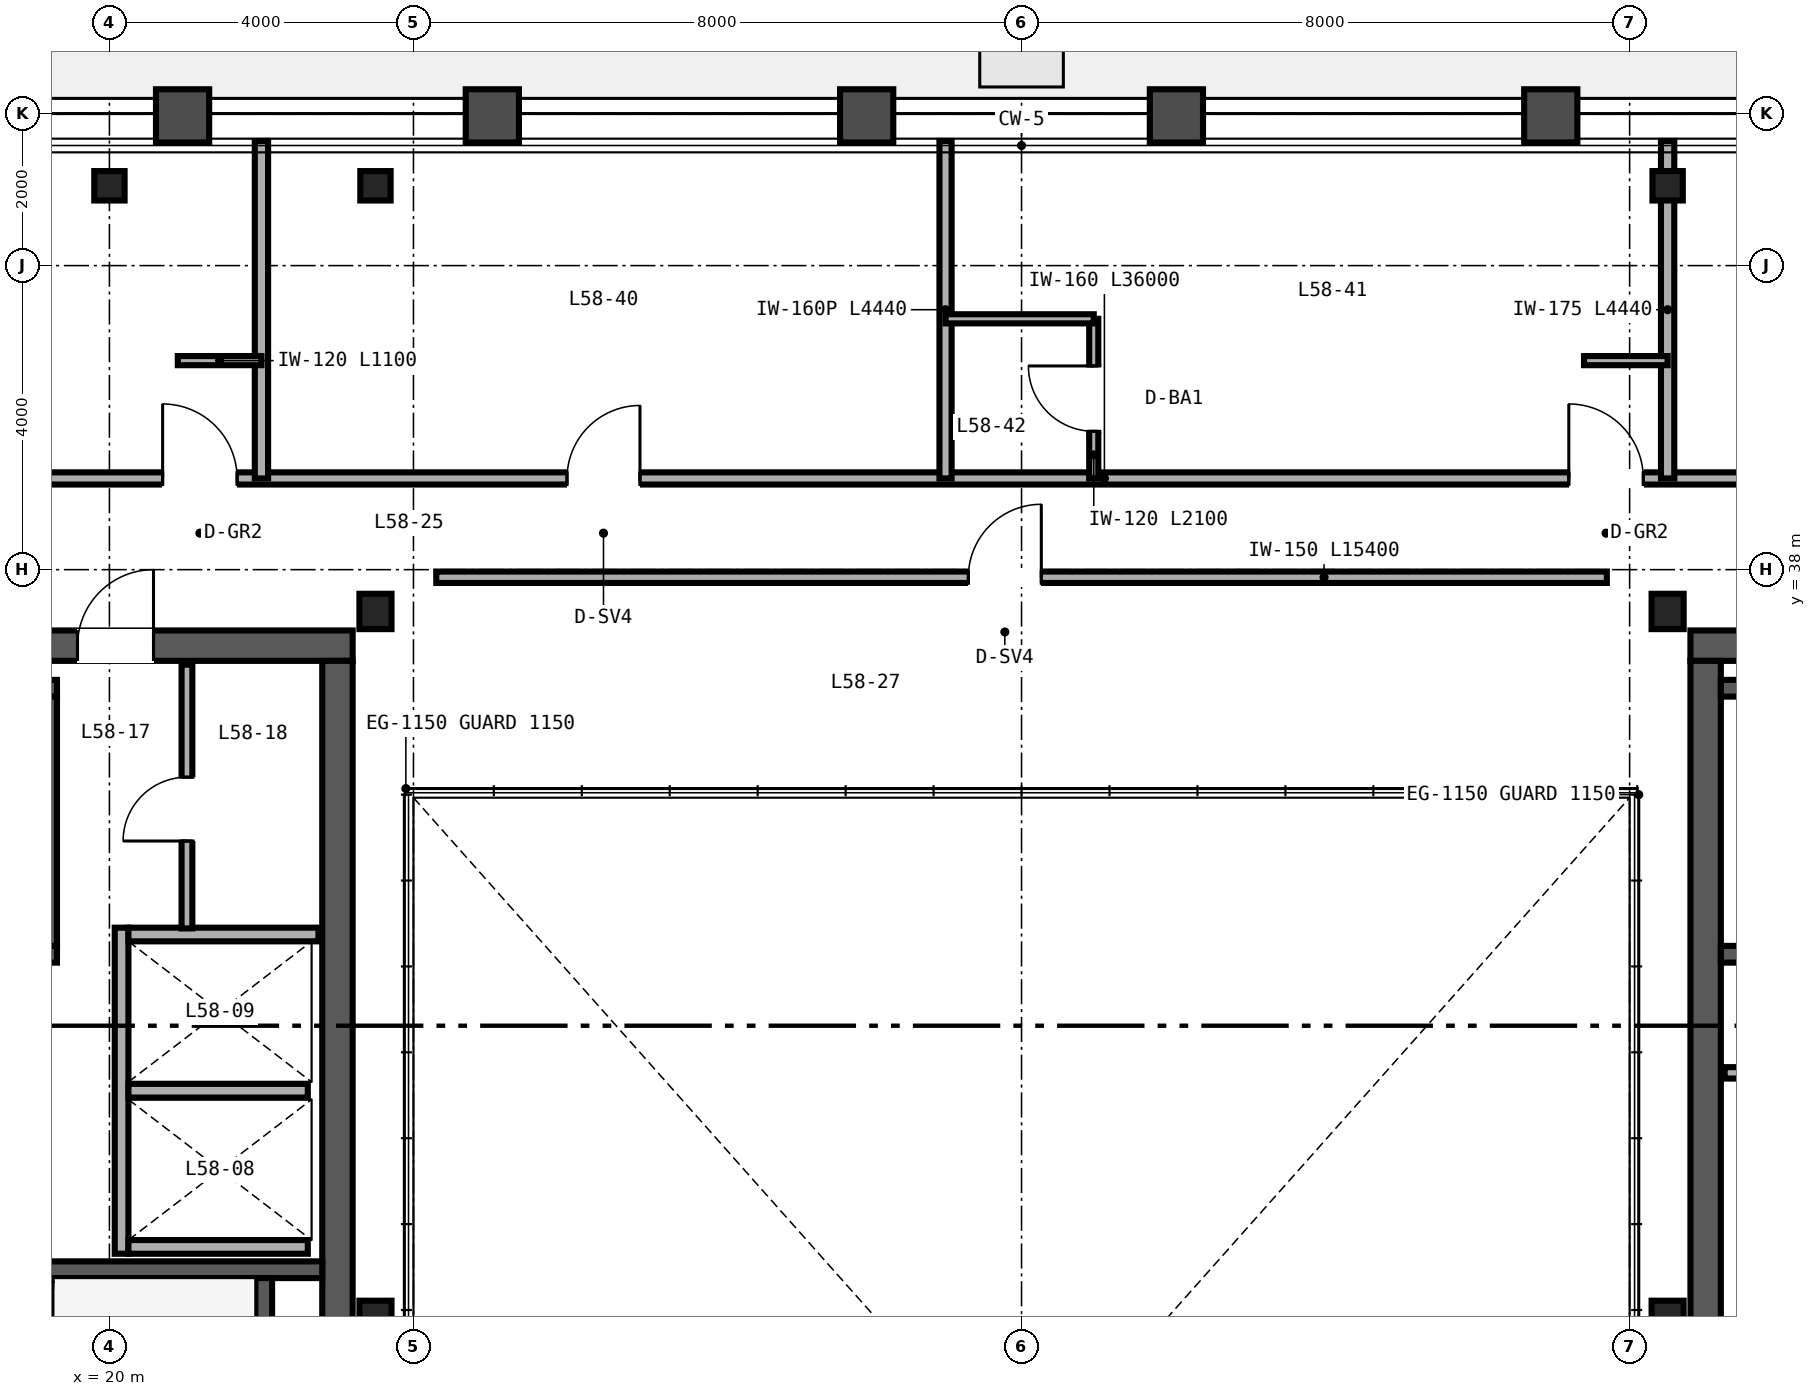
"""IFC4 building model, lengths in metres.
Left out: names, types, materials, properties, quantities, classifications, styles, units other than length and angle.
Written with IfcOpenShell. Run it as: python <this file> out.ifc"""

import sys

from ifc_helpers import new_model, si_unit, direction, frame, frame_2d, origin, origin_2d, place, context, subcontext, project, spatial, rectangle, i_section, extrude, source, transform, mapped, element, fill, save


model = new_model("IFC4")
c1 = context("Model", 3, precision=1e-05, world=origin(), true_north=direction((0.0, 1.0)))
c2 = subcontext(c1, "Body", "Model", "MODEL_VIEW")
j1 = project(units=[si_unit("LENGTHUNIT", "METRE"), si_unit("PLANEANGLEUNIT", "RADIAN")], contexts=[c1])
p1 = place(None, origin())
s1 = spatial("IfcSite", under=j1, at=p1, CompositionType="ELEMENT")
p2 = place(p1, origin())
s2 = spatial("IfcBuilding", under=s1, at=p2, CompositionType="ELEMENT")
p3 = place(p2, frame((0.0, 0.0, 232.8)))
s3 = spatial("IfcBuildingStorey", under=s2, at=p3, CompositionType="ELEMENT", Elevation=232.8)
p4 = place(p3, frame((10.8, 37.0, 0.0), z_axis=(0.0, 0.0, 1.0), x_axis=(1.0, 0.0, 0.0)))
e1 = element("IfcWall", 1, at=p4, inside=s3, PredefinedType="SHEAR", context=c2, shape_type="SweptSolid", body=[
    extrude(rectangle(XDim=12.4, YDim=0.4, at=frame_2d((6.2, 0.0))), origin(), (0.0, 0.0, 1.0), 3.38),
])
p5 = place(p4, frame((8.78, 0.0, 0.0)))
e2 = element("IfcOpeningElement", 2, at=p5, cuts=e1, PredefinedType="OPENING", context=c2, shape_type="SweptSolid", body=[
    extrude(rectangle(XDim=1.0, YDim=2.15, at=frame_2d((0.5, 1.075))), frame((0.0, 0.21, 0.0), z_axis=(0.0, -1.0, 0.0), x_axis=(1.0, 0.0, 0.0)), (0.0, 0.0, 1.0), 0.42),
])
p6 = place(p3, frame((23.0, 15.2, 0.0), z_axis=(0.0, 0.0, 1.0), x_axis=(0.0, 1.0, 0.0)))
e3 = element("IfcWall", 3, at=p6, inside=s3, PredefinedType="SHEAR", context=c2, shape_type="SweptSolid", body=[
    extrude(rectangle(XDim=21.6, YDim=0.4, at=frame_2d((10.8, 0.0))), origin(), (0.0, 0.0, 1.0), 3.38),
])
p7 = place(p3, frame((40.8, 37.0, 0.0), z_axis=(0.0, 0.0, 1.0), x_axis=(1.0, 0.0, 0.0)))
e4 = element("IfcWall", 4, at=p7, inside=s3, PredefinedType="SHEAR", context=c2, shape_type="SweptSolid", body=[
    extrude(rectangle(XDim=12.4, YDim=0.4, at=frame_2d((6.2, 0.0))), origin(), (0.0, 0.0, 1.0), 3.38),
])
p8 = place(p7, frame((9.9, 0.0, 0.0)))
e5 = element("IfcOpeningElement", 5, at=p8, cuts=e4, PredefinedType="OPENING", context=c2, shape_type="SweptSolid", body=[
    extrude(rectangle(XDim=1.1, YDim=2.15, at=frame_2d((0.55, 1.075))), frame((0.0, 0.21, 0.0), z_axis=(0.0, -1.0, 0.0), x_axis=(1.0, 0.0, 0.0)), (0.0, 0.0, 1.0), 0.42),
])
p9 = place(p3, frame((41.0, 15.2, 0.0), z_axis=(0.0, 0.0, 1.0), x_axis=(0.0, 1.0, 0.0)))
e6 = element("IfcWall", 6, at=p9, inside=s3, PredefinedType="SHEAR", context=c2, shape_type="SweptSolid", body=[
    extrude(rectangle(XDim=21.6, YDim=0.4, at=frame_2d((10.8, 0.0))), origin(), (0.0, 0.0, 1.0), 3.38),
])
p10 = place(p3, frame((11.2, 32.94, 0.0), z_axis=(0.0, 0.0, 1.0), x_axis=(1.0, 0.0, 0.0)))
e7 = element("IfcWall", 7, at=p10, inside=s3, PredefinedType="SHEAR", context=c2, shape_type="SweptSolid", body=[
    extrude(rectangle(XDim=8.11, YDim=0.22, at=frame_2d((4.055, 0.0))), origin(), (0.0, 0.0, 1.0), 3.4),
])
p11 = place(p10, frame((0.72, 0.0, 0.0)))
e8 = element("IfcOpeningElement", 8, at=p11, cuts=e7, PredefinedType="OPENING", context=c2, shape_type="SweptSolid", body=[
    extrude(rectangle(XDim=1.05, YDim=2.15, at=frame_2d((0.525, 1.075))), frame((0.0, 0.12, 0.0), z_axis=(0.0, -1.0, 0.0), x_axis=(1.0, 0.0, 0.0)), (0.0, 0.0, 1.0), 0.24),
])
p12 = place(p3, frame((11.2, 36.44, 0.0), z_axis=(0.0, 0.0, 1.0), x_axis=(1.0, 0.0, 0.0)))
e9 = element("IfcWall", 9, at=p12, inside=s3, PredefinedType="SHEAR", context=c2, shape_type="SweptSolid", body=[
    extrude(rectangle(XDim=8.11, YDim=0.22, at=frame_2d((4.055, 0.0))), origin(), (0.0, 0.0, 1.0), 3.4),
])
p13 = place(p3, frame((19.2, 33.05, 0.0), z_axis=(0.0, 0.0, 1.0), x_axis=(0.0, 1.0, 0.0)))
e10 = element("IfcWall", 10, at=p13, inside=s3, PredefinedType="SHEAR", context=c2, shape_type="SweptSolid", body=[
    extrude(rectangle(XDim=3.28, YDim=0.22, at=frame_2d((1.64, 0.0))), origin(), (0.0, 0.0, 1.0), 3.4),
])
p14 = place(p3, frame((14.18, 28.79, 0.0), z_axis=(0.0, 0.0, 1.0), x_axis=(1.0, 0.0, 0.0)))
e11 = element("IfcWall", 11, at=p14, inside=s3, PredefinedType="SHEAR", context=c2, shape_type="SweptSolid", body=[
    extrude(rectangle(XDim=8.62, YDim=0.22, at=frame_2d((4.31, 0.0))), origin(), (0.0, 0.0, 1.0), 3.4),
])
p15 = place(p3, frame((22.03, 25.4, 0.0), z_axis=(0.0, 0.0, 1.0), x_axis=(0.0, 1.0, 0.0)))
e12 = element("IfcWall", 12, at=p15, inside=s3, PredefinedType="SHEAR", context=c2, shape_type="SweptSolid", body=[
    extrude(rectangle(XDim=3.28, YDim=0.22, at=frame_2d((1.64, 0.0))), origin(), (0.0, 0.0, 1.0), 3.4),
])
p16 = place(p3, frame((41.2, 32.94, 0.0), z_axis=(0.0, 0.0, 1.0), x_axis=(1.0, 0.0, 0.0)))
e13 = element("IfcWall", 13, at=p16, inside=s3, PredefinedType="SHEAR", context=c2, shape_type="SweptSolid", body=[
    extrude(rectangle(XDim=8.11, YDim=0.22, at=frame_2d((4.055, 0.0))), origin(), (0.0, 0.0, 1.0), 3.4),
])
p17 = place(p16, frame((0.72, 0.0, 0.0)))
e14 = element("IfcOpeningElement", 14, at=p17, cuts=e13, PredefinedType="OPENING", context=c2, shape_type="SweptSolid", body=[
    extrude(rectangle(XDim=1.05, YDim=2.15, at=frame_2d((0.525, 1.075))), frame((0.0, 0.12, 0.0), z_axis=(0.0, -1.0, 0.0), x_axis=(1.0, 0.0, 0.0)), (0.0, 0.0, 1.0), 0.24),
])
p18 = place(p3, frame((41.2, 36.44, 0.0), z_axis=(0.0, 0.0, 1.0), x_axis=(1.0, 0.0, 0.0)))
e15 = element("IfcWall", 15, at=p18, inside=s3, PredefinedType="SHEAR", context=c2, shape_type="SweptSolid", body=[
    extrude(rectangle(XDim=8.11, YDim=0.22, at=frame_2d((4.055, 0.0))), origin(), (0.0, 0.0, 1.0), 3.4),
])
m1 = source(origin(), c2, "Body", "SweptSolid", [
    extrude(i_section(OverallWidth=0.422, OverallDepth=0.465, WebThickness=0.045, FlangeThickness=0.073, FilletRadius=0.025, at=origin_2d()), origin(), (0.0, 0.0, 1.0), 3.38),
])
for number, where, z_axis, x_axis in (
    (16, (23.5, 28.15, 0.0), (0.0, 0.0, 1.0), (1.0, 0.0, 0.0)),
    (17, (40.5, 28.15, 0.0), (0.0, 0.0, 1.0), (1.0, 0.0, 0.0)),
    (18, (23.5, 37.45, 0.0), (0.0, 0.0, 1.0), (1.0, 0.0, 0.0)),
    (19, (40.5, 37.45, 0.0), (0.0, 0.0, 1.0), (1.0, 0.0, 0.0)),
):
    element("IfcColumn", number, at=place(p3, frame(where, z_axis=z_axis, x_axis=x_axis)), inside=s3, PredefinedType="COLUMN", context=c2, shape_type="MappedRepresentation", body=[
        mapped(m1, transform((0.0, 0.0, 0.0), scale=1.0)),
    ])
m2 = source(origin(), c2, "Body", "SweptSolid", [
    extrude(i_section(OverallWidth=0.399, OverallDepth=0.387, WebThickness=0.021, FlangeThickness=0.033, FilletRadius=0.025, at=origin_2d()), origin(), (0.0, 0.0, 1.0), 3.38),
])
for number, where, z_axis, x_axis in (
    (20, (20.0, 43.05, 0.0), (0.0, 0.0, 1.0), (1.0, 0.0, 0.0)),
    (21, (23.5, 43.05, 0.0), (0.0, 0.0, 1.0), (1.0, 0.0, 0.0)),
    (22, (40.5, 43.05, 0.0), (0.0, 0.0, 1.0), (1.0, 0.0, 0.0)),
):
    element("IfcColumn", number, at=place(p3, frame(where, z_axis=z_axis, x_axis=x_axis)), inside=s3, PredefinedType="COLUMN", context=c2, shape_type="MappedRepresentation", body=[
        mapped(m2, transform((0.0, 0.0, 0.0), scale=1.0)),
    ])
p19 = place(p3, frame((20.16, 29.0, 0.0), z_axis=(0.0, 0.0, 1.0), x_axis=(0.0, 1.0, 0.0)))
e23 = element("IfcWall", 23, at=p19, inside=s3, PredefinedType="SOLIDWALL", context=c2, shape_type="SweptSolid", body=[
    extrude(rectangle(XDim=4.29, YDim=0.18, at=frame_2d((2.145, 0.0))), origin(), (0.0, 0.0, 1.0), 3.38),
])
p20 = place(p3, frame((20.25, 29.09, 0.0), z_axis=(0.0, 0.0, 1.0), x_axis=(1.0, 0.0, 0.0)))
e24 = element("IfcWall", 24, at=p20, inside=s3, PredefinedType="SOLIDWALL", context=c2, shape_type="SweptSolid", body=[
    extrude(rectangle(XDim=2.36, YDim=0.18, at=frame_2d((1.18, 0.0))), origin(), (0.0, 0.0, 1.0), 3.38),
])
p21 = place(p3, frame((20.25, 33.2, 0.0), z_axis=(0.0, 0.0, 1.0), x_axis=(1.0, 0.0, 0.0)))
e25 = element("IfcWall", 25, at=p21, inside=s3, PredefinedType="SOLIDWALL", context=c2, shape_type="SweptSolid", body=[
    extrude(rectangle(XDim=2.5, YDim=0.18, at=frame_2d((1.25, 0.0))), origin(), (0.0, 0.0, 1.0), 3.38),
])
p22 = place(p3, frame((20.25, 31.145, 0.0), z_axis=(0.0, 0.0, 1.0), x_axis=(1.0, 0.0, 0.0)))
e26 = element("IfcWall", 26, at=p22, inside=s3, PredefinedType="SOLIDWALL", context=c2, shape_type="SweptSolid", body=[
    extrude(rectangle(XDim=2.36, YDim=0.18, at=frame_2d((1.18, 0.0))), origin(), (0.0, 0.0, 1.0), 3.38),
])
p23 = place(p3, frame((21.02, 33.28, 0.0), z_axis=(0.0, 0.0, 1.0), x_axis=(0.0, 1.0, 0.0)))
e27 = element("IfcWall", 27, at=p23, inside=s3, PredefinedType="PARTITIONING", context=c2, shape_type="SweptSolid", body=[
    extrude(rectangle(XDim=3.47, YDim=0.142, at=frame_2d((1.735, 0.0))), origin(), (0.0, 0.0, 1.0), 3.38),
])
p24 = place(p23, frame((1.15, 0.0, 0.0)))
e28 = element("IfcOpeningElement", 28, at=p24, cuts=e27, PredefinedType="OPENING", context=c2, shape_type="SweptSolid", body=[
    extrude(rectangle(XDim=0.84, YDim=2.1, at=frame_2d((0.42, 1.05))), frame((0.0, 0.081, 0.0), z_axis=(0.0, -1.0, 0.0), x_axis=(1.0, 0.0, 0.0)), (0.0, 0.0, 1.0), 0.162),
])
p25 = place(p3, frame((41.25, 31.38, 0.0), z_axis=(0.0, 0.0, 1.0), x_axis=(1.0, 0.0, 0.0)))
e29 = element("IfcWall", 29, at=p25, inside=s3, PredefinedType="PARTITIONING", context=c2, shape_type="SweptSolid", body=[
    extrude(rectangle(XDim=7.87, YDim=0.15, at=frame_2d((3.935, 0.0))), origin(), (0.0, 0.0, 1.0), 2.48),
])
p26 = place(p25, frame((3.6, 0.0, 0.0)))
e30 = element("IfcOpeningElement", 30, at=p26, cuts=e29, PredefinedType="OPENING", context=c2, shape_type="SweptSolid", body=[
    extrude(rectangle(XDim=0.9, YDim=2.15, at=frame_2d((0.45, 1.075))), frame((0.0, 0.085, 0.0), z_axis=(0.0, -1.0, 0.0), x_axis=(1.0, 0.0, 0.0)), (0.0, 0.0, 1.0), 0.17),
])
p27 = place(p3, frame((24.3, 37.9, 0.0), z_axis=(0.0, 0.0, 1.0), x_axis=(1.0, 0.0, 0.0)))
e31 = element("IfcWall", 31, at=p27, inside=s3, PredefinedType="PARTITIONING", context=c2, shape_type="SweptSolid", body=[
    extrude(rectangle(XDim=15.4, YDim=0.15, at=frame_2d((7.7, 0.0))), origin(), (0.0, 0.0, 1.0), 3.38),
])
p28 = place(p27, frame((7.0, 0.0, 0.0)))
e32 = element("IfcOpeningElement", 32, at=p28, cuts=e31, PredefinedType="OPENING", context=c2, shape_type="SweptSolid", body=[
    extrude(rectangle(XDim=0.96, YDim=2.15, at=frame_2d((0.48, 1.075))), frame((0.0, 0.085, 0.0), z_axis=(0.0, -1.0, 0.0), x_axis=(1.0, 0.0, 0.0)), (0.0, 0.0, 1.0), 0.17),
])
p29 = place(p3, frame((14.0, 39.2, 0.0), z_axis=(0.0, 0.0, 1.0), x_axis=(1.0, 0.0, 0.0)))
e33 = element("IfcWall", 33, at=p29, inside=s3, PredefinedType="PARTITIONING", context=c2, shape_type="SweptSolid", body=[
    extrude(rectangle(XDim=36.0, YDim=0.16, at=frame_2d((18.0, 0.0))), origin(), (0.0, 0.0, 1.0), 2.923),
])
p30 = place(p29, frame((6.7, 0.0, 0.0)))
e34 = element("IfcOpeningElement", 34, at=p30, cuts=e33, PredefinedType="OPENING", context=c2, shape_type="SweptSolid", body=[
    extrude(rectangle(XDim=0.98, YDim=2.2, at=frame_2d((0.49, 1.1))), frame((0.0, 0.09, 0.0), z_axis=(0.0, -1.0, 0.0), x_axis=(1.0, 0.0, 0.0)), (0.0, 0.0, 1.0), 0.18),
])
p31 = place(p29, frame((12.02, 0.0, 0.0)))
e35 = element("IfcOpeningElement", 35, at=p31, cuts=e33, PredefinedType="OPENING", context=c2, shape_type="SweptSolid", body=[
    extrude(rectangle(XDim=0.96, YDim=2.15, at=frame_2d((0.48, 1.075))), frame((0.0, 0.09, 0.0), z_axis=(0.0, -1.0, 0.0), x_axis=(1.0, 0.0, 0.0)), (0.0, 0.0, 1.0), 0.18),
])
p32 = place(p29, frame((25.2, 0.0, 0.0)))
e36 = element("IfcOpeningElement", 36, at=p32, cuts=e33, PredefinedType="OPENING", context=c2, shape_type="SweptSolid", body=[
    extrude(rectangle(XDim=0.98, YDim=2.2, at=frame_2d((0.49, 1.1))), frame((0.0, 0.09, 0.0), z_axis=(0.0, -1.0, 0.0), x_axis=(1.0, 0.0, 0.0)), (0.0, 0.0, 1.0), 0.18),
])
p33 = place(p29, frame((30.77, 0.0, 0.0)))
e37 = element("IfcOpeningElement", 37, at=p33, cuts=e33, PredefinedType="OPENING", context=c2, shape_type="SweptSolid", body=[
    extrude(rectangle(XDim=0.96, YDim=2.15, at=frame_2d((0.48, 1.075))), frame((0.0, 0.09, 0.0), z_axis=(0.0, -1.0, 0.0), x_axis=(1.0, 0.0, 0.0)), (0.0, 0.0, 1.0), 0.18),
])
p34 = place(p3, frame((22.0, 39.2, 0.0), z_axis=(0.0, 0.0, 1.0), x_axis=(0.0, 1.0, 0.0)))
e38 = element("IfcWall", 38, at=p34, inside=s3, PredefinedType="PARTITIONING", context=c2, shape_type="SweptSolid", body=[
    extrude(rectangle(XDim=4.44, YDim=0.175, at=frame_2d((2.22, 0.0))), origin(), (0.0, 0.0, 1.0), 2.843),
])
p35 = place(p3, frame((20.9, 40.75, 0.0), z_axis=(0.0, 0.0, 1.0), x_axis=(1.0, 0.0, 0.0)))
e39 = element("IfcWall", 39, at=p35, inside=s3, PredefinedType="PARTITIONING", context=c2, shape_type="SweptSolid", body=[
    extrude(rectangle(XDim=1.1, YDim=0.12, at=frame_2d((0.55, 0.0))), origin(), (0.0, 0.0, 1.0), 3.38),
])
p36 = place(p3, frame((31.0, 39.2, 0.0), z_axis=(0.0, 0.0, 1.0), x_axis=(0.0, 1.0, 0.0)))
e40 = element("IfcWall", 40, at=p36, inside=s3, PredefinedType="PARTITIONING", context=c2, shape_type="SweptSolid", body=[
    extrude(rectangle(XDim=4.44, YDim=0.16, at=frame_2d((2.22, 0.0))), origin(), (0.0, 0.0, 1.0), 2.453),
])
p37 = place(p3, frame((40.5, 39.2, 0.0), z_axis=(0.0, 0.0, 1.0), x_axis=(0.0, 1.0, 0.0)))
e41 = element("IfcWall", 41, at=p37, inside=s3, PredefinedType="PARTITIONING", context=c2, shape_type="SweptSolid", body=[
    extrude(rectangle(XDim=4.44, YDim=0.175, at=frame_2d((2.22, 0.0))), origin(), (0.0, 0.0, 1.0), 2.453),
])
p38 = place(p3, frame((32.95, 39.2, 0.0), z_axis=(0.0, 0.0, 1.0), x_axis=(0.0, 1.0, 0.0)))
e42 = element("IfcWall", 42, at=p38, inside=s3, PredefinedType="PARTITIONING", context=c2, shape_type="SweptSolid", body=[
    extrude(rectangle(XDim=2.1, YDim=0.12, at=frame_2d((1.05, 0.0))), origin(), (0.0, 0.0, 1.0), 3.38),
])
p39 = place(p38, frame((0.62, 0.0, 0.0)))
e43 = element("IfcOpeningElement", 43, at=p39, cuts=e42, PredefinedType="OPENING", context=c2, shape_type="SweptSolid", body=[
    extrude(rectangle(XDim=0.86, YDim=2.1, at=frame_2d((0.43, 1.05))), frame((0.0, 0.07, 0.0), z_axis=(0.0, -1.0, 0.0), x_axis=(1.0, 0.0, 0.0)), (0.0, 0.0, 1.0), 0.14),
])
p40 = place(p3, frame((31.0, 41.3, 0.0), z_axis=(0.0, 0.0, 1.0), x_axis=(1.0, 0.0, 0.0)))
e44 = element("IfcWall", 44, at=p40, inside=s3, PredefinedType="PARTITIONING", context=c2, shape_type="SweptSolid", body=[
    extrude(rectangle(XDim=1.95, YDim=0.12, at=frame_2d((0.975, 0.0))), origin(), (0.0, 0.0, 1.0), 3.38),
])
p41 = place(p3, frame((39.4, 40.75, 0.0), z_axis=(0.0, 0.0, 1.0), x_axis=(1.0, 0.0, 0.0)))
e45 = element("IfcWall", 45, at=p41, inside=s3, PredefinedType="PARTITIONING", context=c2, shape_type="SweptSolid", body=[
    extrude(rectangle(XDim=1.1, YDim=0.12, at=frame_2d((0.55, 0.0))), origin(), (0.0, 0.0, 1.0), 2.923),
])
p42 = place(p3, frame((0.0, 0.0, -0.22)))
p43 = place(p42, frame((32.0, 44.9, 0.0)))
p44 = place(p43, frame((0.0, 0.0, 0.17)))
e46 = element("IfcDoor", 46, at=p44, inside=s3, OperationType="SINGLE_SWING_LEFT", PredefinedType="TRAPDOOR", context=c2, shape_type="SweptSolid", body=[
    extrude(rectangle(XDim=1.1, YDim=1.1, at=origin_2d()), origin(), (0.0, 0.0, 1.0), 0.05),
])
m3 = source(origin(), c2, "Body", "SweptSolid", [
    extrude(rectangle(XDim=0.84, YDim=2.1, at=frame_2d((0.42, 1.05))), frame((0.0, 0.025, 0.0), z_axis=(0.0, -1.0, 0.0), x_axis=(1.0, 0.0, 0.0)), (0.0, 0.0, 1.0), 0.05),
])
p45 = place(p24, origin())
e47 = element("IfcDoor", 47, at=p45, inside=s3, OperationType="SINGLE_SWING_LEFT", PredefinedType="DOOR", context=c2, shape_type="MappedRepresentation", body=[
    mapped(m3, transform((0.0, 0.0, 0.0), scale=1.0)),
])
fill(e28, e47)
m4 = source(origin(), c2, "Body", "SweptSolid", [
    extrude(rectangle(XDim=1.0, YDim=2.15, at=frame_2d((0.5, 1.075))), frame((0.0, 0.025, 0.0), z_axis=(0.0, -1.0, 0.0), x_axis=(1.0, 0.0, 0.0)), (0.0, 0.0, 1.0), 0.05),
])
p46 = place(p5, origin())
e48 = element("IfcDoor", 48, at=p46, inside=s3, OperationType="SINGLE_SWING_RIGHT", PredefinedType="DOOR", context=c2, shape_type="MappedRepresentation", body=[
    mapped(m4, transform((0.0, 0.0, 0.0), scale=1.0)),
])
fill(e2, e48)
m5 = source(origin(), c2, "Body", "SweptSolid", [
    extrude(rectangle(XDim=0.96, YDim=2.15, at=frame_2d((0.48, 1.075))), frame((0.0, 0.025, 0.0), z_axis=(0.0, -1.0, 0.0), x_axis=(1.0, 0.0, 0.0)), (0.0, 0.0, 1.0), 0.05),
])
p47 = place(p28, origin())
e49 = element("IfcDoor", 49, at=p47, inside=s3, OperationType="SINGLE_SWING_RIGHT", PredefinedType="DOOR", context=c2, shape_type="MappedRepresentation", body=[
    mapped(m5, transform((0.0, 0.0, 0.0), scale=1.0)),
])
fill(e32, e49)
m6 = source(origin(), c2, "Body", "SweptSolid", [
    extrude(rectangle(XDim=0.86, YDim=2.1, at=frame_2d((0.43, 1.05))), frame((0.0, 0.025, 0.0), z_axis=(0.0, -1.0, 0.0), x_axis=(1.0, 0.0, 0.0)), (0.0, 0.0, 1.0), 0.05),
])
p48 = place(p39, origin())
e50 = element("IfcDoor", 50, at=p48, inside=s3, OperationType="SINGLE_SWING_RIGHT", PredefinedType="DOOR", context=c2, shape_type="MappedRepresentation", body=[
    mapped(m6, transform((0.0, 0.0, 0.0), scale=1.0)),
])
fill(e43, e50)
m7 = source(origin(), c2, "Body", "SweptSolid", [
    extrude(rectangle(XDim=0.98, YDim=2.2, at=frame_2d((0.49, 1.1))), frame((0.0, 0.025, 0.0), z_axis=(0.0, -1.0, 0.0), x_axis=(1.0, 0.0, 0.0)), (0.0, 0.0, 1.0), 0.05),
])
p49 = place(p30, origin())
e51 = element("IfcDoor", 51, at=p49, inside=s3, OperationType="SINGLE_SWING_LEFT", PredefinedType="DOOR", context=c2, shape_type="MappedRepresentation", body=[
    mapped(m7, transform((0.0, 0.0, 0.0), scale=1.0)),
])
fill(e34, e51)
p50 = place(p31, origin())
e52 = element("IfcDoor", 52, at=p50, inside=s3, OperationType="SINGLE_SWING_RIGHT", PredefinedType="DOOR", context=c2, shape_type="MappedRepresentation", body=[
    mapped(m5, transform((0.0, 0.0, 0.0), scale=1.0)),
])
fill(e35, e52)
p51 = place(p32, origin())
e53 = element("IfcDoor", 53, at=p51, inside=s3, OperationType="SINGLE_SWING_LEFT", PredefinedType="DOOR", context=c2, shape_type="MappedRepresentation", body=[
    mapped(m7, transform((0.0, 0.0, 0.0), scale=1.0)),
])
fill(e36, e53)
save(model, sys.argv[1])
